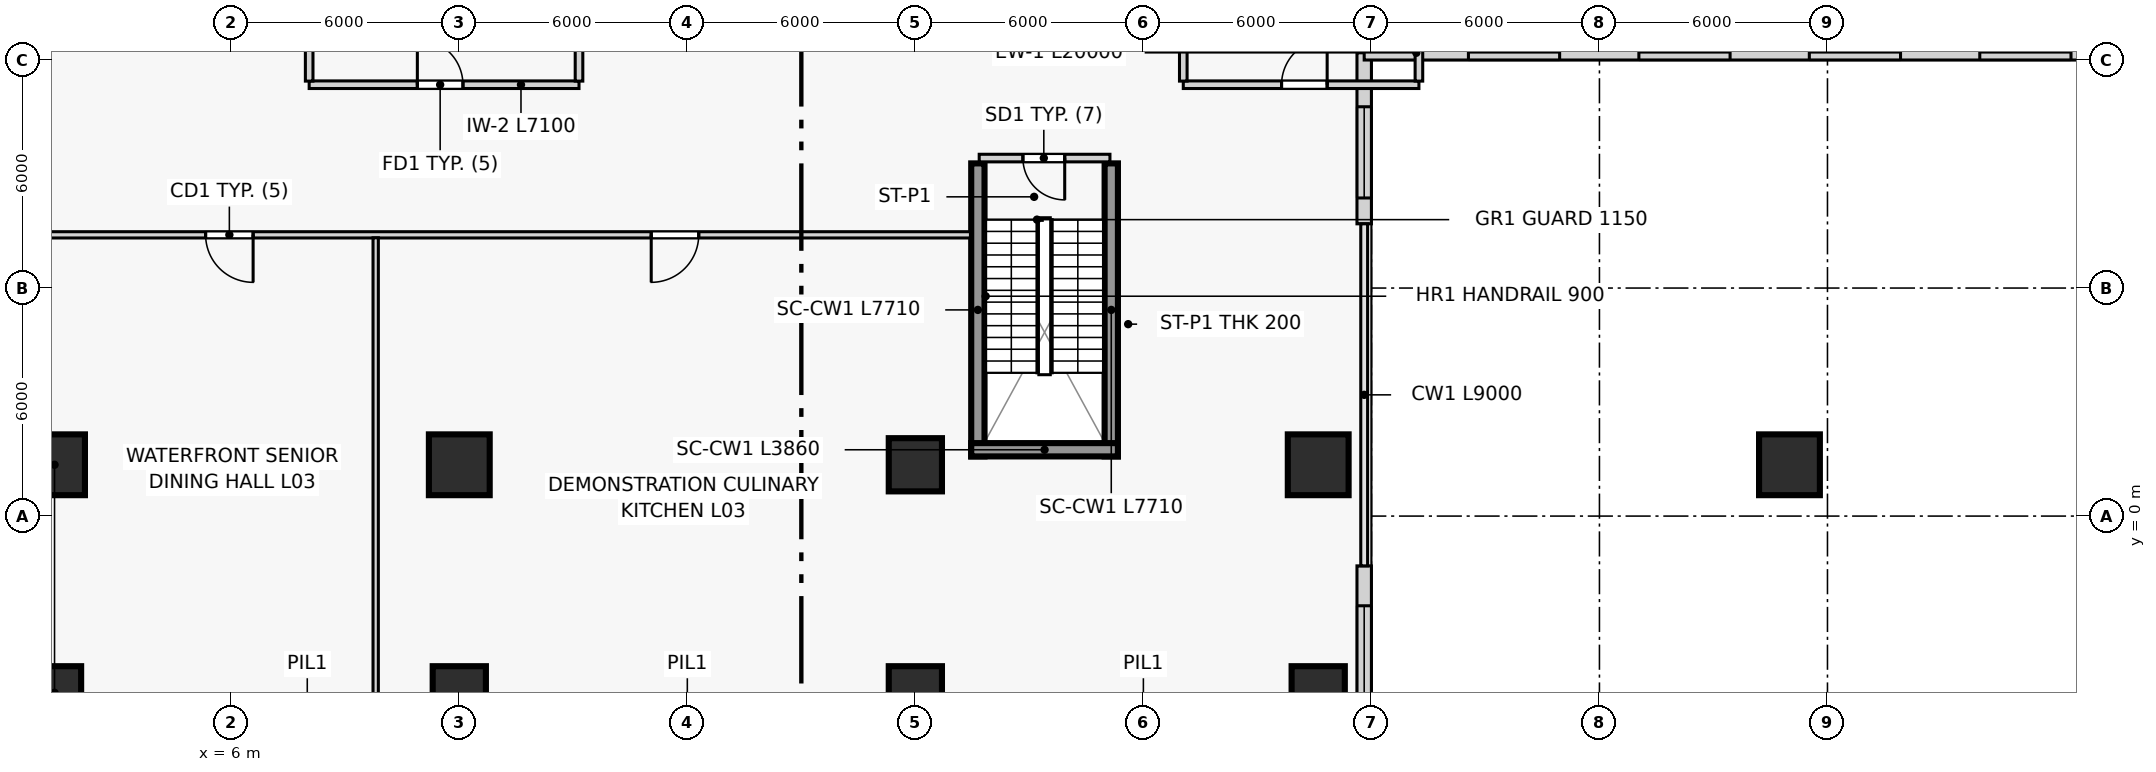
"""IFC4 building model, lengths in metres.
Left out: names, types, materials, properties, quantities, classifications, styles, units other than length and angle.
Written with IfcOpenShell. Run it as: python <this file> out.ifc"""

import sys

from ifc_helpers import new_model, si_unit, direction, frame, frame_2d, origin, origin_2d, place, context, subcontext, project, spatial, rectangle, extrude, source, transform, mapped, element, fill, save


model = new_model("IFC4")
c1 = context("Model", 3, precision=1e-05, world=origin(), true_north=direction((0.0, 1.0)))
c2 = subcontext(c1, "Body", "Model", "MODEL_VIEW")
j1 = project(units=[si_unit("LENGTHUNIT", "METRE"), si_unit("PLANEANGLEUNIT", "RADIAN")], contexts=[c1])
p1 = place(None, origin())
s1 = spatial("IfcSite", under=j1, at=p1, CompositionType="ELEMENT")
p2 = place(p1, origin())
s2 = spatial("IfcBuilding", under=s1, at=p2, CompositionType="ELEMENT")
p3 = place(p2, frame((0.0, 0.0, 13.5)))
s3 = spatial("IfcBuildingStorey", under=s2, at=p3, CompositionType="ELEMENT", Elevation=13.5)
for number, where, z_axis, x_axis in (
    (1, (25.645, 1.57, 0.0), (0.0, 0.0, 1.0), (0.0, 1.0, 0.0)),
    (2, (29.155, 1.57, 0.0), (0.0, 0.0, 1.0), (0.0, 1.0, 0.0)),
):
    element("IfcWall", number, at=place(p3, frame(where, z_axis=z_axis, x_axis=x_axis)), inside=s3, PredefinedType="SHEAR", context=c2, shape_type="SweptSolid", body=[
        extrude(rectangle(XDim=7.71, YDim=0.35, at=frame_2d((3.855, 0.0))), origin(), (0.0, 0.0, 1.0), 4.5),
    ])
p4 = place(p3, frame((25.47, 1.745, 0.0), z_axis=(0.0, 0.0, 1.0), x_axis=(1.0, 0.0, 0.0)))
e3 = element("IfcWall", 3, at=p4, inside=s3, PredefinedType="SHEAR", context=c2, shape_type="SweptSolid", body=[
    extrude(rectangle(XDim=3.86, YDim=0.35, at=frame_2d((1.93, 0.0))), origin(), (0.0, 0.0, 1.0), 4.5),
])
m1 = source(origin(), c2, "Body", "SweptSolid", [
    extrude(rectangle(XDim=1.4, YDim=1.4, at=origin_2d()), origin(), (0.0, 0.0, 1.0), 4.5),
])
p5 = place(p3, frame((1.35, -4.65, 0.0), z_axis=(0.0, 0.0, 1.0), x_axis=(1.0, 0.0, 0.0)))
e4 = element("IfcColumn", 4, at=p5, inside=s3, PredefinedType="COLUMN", context=c2, shape_type="MappedRepresentation", body=[
    mapped(m1, transform((0.0, 0.0, 0.0), scale=1.0)),
])
m2 = source(origin(), c2, "Body", "SweptSolid", [
    extrude(rectangle(XDim=1.6, YDim=1.6, at=origin_2d()), origin(), (0.0, 0.0, 1.0), 4.5),
])
p6 = place(p3, frame((1.35, 1.35, 0.0), z_axis=(0.0, 0.0, 1.0), x_axis=(1.0, 0.0, 0.0)))
e5 = element("IfcColumn", 5, at=p6, inside=s3, PredefinedType="COLUMN", context=c2, shape_type="MappedRepresentation", body=[
    mapped(m2, transform((0.0, 0.0, 0.0), scale=1.0)),
])
p7 = place(p3, frame((12.0, -4.65, 0.0), z_axis=(0.0, 0.0, 1.0), x_axis=(1.0, 0.0, 0.0)))
e6 = element("IfcColumn", 6, at=p7, inside=s3, PredefinedType="COLUMN", context=c2, shape_type="MappedRepresentation", body=[
    mapped(m1, transform((0.0, 0.0, 0.0), scale=1.0)),
])
p8 = place(p3, frame((12.0, 1.35, 0.0), z_axis=(0.0, 0.0, 1.0), x_axis=(1.0, 0.0, 0.0)))
e7 = element("IfcColumn", 7, at=p8, inside=s3, PredefinedType="COLUMN", context=c2, shape_type="MappedRepresentation", body=[
    mapped(m2, transform((0.0, 0.0, 0.0), scale=1.0)),
])
for number, where, z_axis, x_axis in (
    (8, (24.0, -4.65, 0.0), (0.0, 0.0, 1.0), (1.0, 0.0, 0.0)),
    (9, (24.0, 1.35, 0.0), (0.0, 0.0, 1.0), (1.0, 0.0, 0.0)),
    (10, (34.6, -4.65, 0.0), (0.0, 0.0, 1.0), (1.0, 0.0, 0.0)),
):
    element("IfcColumn", number, at=place(p3, frame(where, z_axis=z_axis, x_axis=x_axis)), inside=s3, PredefinedType="COLUMN", context=c2, shape_type="MappedRepresentation", body=[
        mapped(m1, transform((0.0, 0.0, 0.0), scale=1.0)),
    ])
for number, where, z_axis, x_axis in (
    (11, (34.6, 1.35, 0.0), (0.0, 0.0, 1.0), (1.0, 0.0, 0.0)),
    (12, (47.0, 1.35, 0.0), (0.0, 0.0, 1.0), (1.0, 0.0, 0.0)),
):
    element("IfcColumn", number, at=place(p3, frame(where, z_axis=z_axis, x_axis=x_axis)), inside=s3, PredefinedType="COLUMN", context=c2, shape_type="MappedRepresentation", body=[
        mapped(m2, transform((0.0, 0.0, 0.0), scale=1.0)),
    ])
p9 = place(p3, frame((35.81, -5.81, 0.0), z_axis=(0.0, 0.0, 1.0), x_axis=(0.0, 1.0, 0.0)))
e13 = element("IfcWall", 13, at=p9, inside=s3, PredefinedType="SOLIDWALL", context=c2, shape_type="SweptSolid", body=[
    extrude(rectangle(XDim=4.5, YDim=0.38, at=frame_2d((2.25, 0.0))), origin(), (0.0, 0.0, 1.0), 4.16),
])
p10 = place(p9, frame((1.05, 0.0, 0.8)))
e14 = element("IfcOpeningElement", 14, at=p10, cuts=e13, PredefinedType="OPENING", context=c2, shape_type="SweptSolid", body=[
    extrude(rectangle(XDim=2.4, YDim=2.1, at=frame_2d((1.2, 1.05))), frame((0.0, 0.2, 0.0), z_axis=(0.0, -1.0, 0.0), x_axis=(1.0, 0.0, 0.0)), (0.0, 0.0, 1.0), 0.4),
])
p11 = place(p3, frame((35.81, 7.69, 0.0), z_axis=(0.0, 0.0, 1.0), x_axis=(0.0, 1.0, 0.0)))
e15 = element("IfcWall", 15, at=p11, inside=s3, PredefinedType="SOLIDWALL", context=c2, shape_type="SweptSolid", body=[
    extrude(rectangle(XDim=4.5, YDim=0.38, at=frame_2d((2.25, 0.0))), origin(), (0.0, 0.0, 1.0), 4.16),
])
p12 = place(p11, frame((0.68, 0.0, 0.8)))
e16 = element("IfcOpeningElement", 16, at=p12, cuts=e15, PredefinedType="OPENING", context=c2, shape_type="SweptSolid", body=[
    extrude(rectangle(XDim=2.4, YDim=2.1, at=frame_2d((1.2, 1.05))), frame((0.0, 0.2, 0.0), z_axis=(0.0, -1.0, 0.0), x_axis=(1.0, 0.0, 0.0)), (0.0, 0.0, 1.0), 0.4),
])
p13 = place(p3, frame((35.81, 12.19, 0.0), z_axis=(0.0, 0.0, 1.0), x_axis=(1.0, 0.0, 0.0)))
e17 = element("IfcWall", 17, at=p13, inside=s3, PredefinedType="SOLIDWALL", context=c2, shape_type="SweptSolid", body=[
    extrude(rectangle(XDim=20.0, YDim=0.38, at=frame_2d((10.0, 0.0))), origin(), (0.0, 0.0, 1.0), 4.16),
])
p14 = place(p13, frame((2.742, 0.0, 0.8)))
e18 = element("IfcOpeningElement", 18, at=p14, cuts=e17, PredefinedType="OPENING", context=c2, shape_type="SweptSolid", body=[
    extrude(rectangle(XDim=2.4, YDim=2.1, at=frame_2d((1.2, 1.05))), frame((0.0, 0.2, 0.0), z_axis=(0.0, -1.0, 0.0), x_axis=(1.0, 0.0, 0.0)), (0.0, 0.0, 1.0), 0.4),
])
p15 = place(p13, frame((7.228, 0.0, 0.8)))
e19 = element("IfcOpeningElement", 19, at=p15, cuts=e17, PredefinedType="OPENING", context=c2, shape_type="SweptSolid", body=[
    extrude(rectangle(XDim=2.4, YDim=2.1, at=frame_2d((1.2, 1.05))), frame((0.0, 0.2, 0.0), z_axis=(0.0, -1.0, 0.0), x_axis=(1.0, 0.0, 0.0)), (0.0, 0.0, 1.0), 0.4),
])
p16 = place(p13, frame((11.712, 0.0, 0.8)))
e20 = element("IfcOpeningElement", 20, at=p16, cuts=e17, PredefinedType="OPENING", context=c2, shape_type="SweptSolid", body=[
    extrude(rectangle(XDim=2.4, YDim=2.1, at=frame_2d((1.2, 1.05))), frame((0.0, 0.2, 0.0), z_axis=(0.0, -1.0, 0.0), x_axis=(1.0, 0.0, 0.0)), (0.0, 0.0, 1.0), 0.4),
])
p17 = place(p13, frame((16.198, 0.0, 0.8)))
e21 = element("IfcOpeningElement", 21, at=p17, cuts=e17, PredefinedType="OPENING", context=c2, shape_type="SweptSolid", body=[
    extrude(rectangle(XDim=2.4, YDim=2.1, at=frame_2d((1.2, 1.05))), frame((0.0, 0.2, 0.0), z_axis=(0.0, -1.0, 0.0), x_axis=(1.0, 0.0, 0.0)), (0.0, 0.0, 1.0), 0.4),
])
p18 = place(p3, frame((8.05, 11.35, 0.0), z_axis=(0.0, 0.0, 1.0), x_axis=(1.0, 0.0, 0.0)))
e22 = element("IfcWall", 22, at=p18, inside=s3, PredefinedType="PARTITIONING", context=c2, shape_type="SweptSolid", body=[
    extrude(rectangle(XDim=7.1, YDim=0.2, at=frame_2d((3.55, 0.0))), origin(), (0.0, 0.0, 1.0), 4.16),
])
p19 = place(p18, frame((2.846, 0.0, 0.0)))
e23 = element("IfcOpeningElement", 23, at=p19, cuts=e22, PredefinedType="OPENING", context=c2, shape_type="SweptSolid", body=[
    extrude(rectangle(XDim=1.2, YDim=2.2, at=frame_2d((0.6, 1.1))), frame((0.0, 0.11, 0.0), z_axis=(0.0, -1.0, 0.0), x_axis=(1.0, 0.0, 0.0)), (0.0, 0.0, 1.0), 0.22),
])
for number, where, z_axis, x_axis in (
    (24, (8.05, 11.445, 0.0), (0.0, 0.0, 1.0), (0.0, 1.0, 0.0)),
    (25, (15.15, 11.445, 0.0), (0.0, 0.0, 1.0), (0.0, 1.0, 0.0)),
):
    element("IfcWall", number, at=place(p3, frame(where, z_axis=z_axis, x_axis=x_axis)), inside=s3, PredefinedType="PARTITIONING", context=c2, shape_type="SweptSolid", body=[
        extrude(rectangle(XDim=2.985, YDim=0.2, at=frame_2d((1.492, 0.0))), origin(), (0.0, 0.0, 1.0), 4.16),
    ])
p20 = place(p3, frame((31.05, 11.35, 0.0), z_axis=(0.0, 0.0, 1.0), x_axis=(1.0, 0.0, 0.0)))
e26 = element("IfcWall", 26, at=p20, inside=s3, PredefinedType="PARTITIONING", context=c2, shape_type="SweptSolid", body=[
    extrude(rectangle(XDim=6.2, YDim=0.2, at=frame_2d((3.1, 0.0))), origin(), (0.0, 0.0, 1.0), 4.16),
])
p21 = place(p20, frame((2.586, 0.0, 0.0)))
e27 = element("IfcOpeningElement", 27, at=p21, cuts=e26, PredefinedType="OPENING", context=c2, shape_type="SweptSolid", body=[
    extrude(rectangle(XDim=1.2, YDim=2.2, at=frame_2d((0.6, 1.1))), frame((0.0, 0.11, 0.0), z_axis=(0.0, -1.0, 0.0), x_axis=(1.0, 0.0, 0.0)), (0.0, 0.0, 1.0), 0.22),
])
for number, where, z_axis, x_axis in (
    (28, (31.05, 11.445, 0.0), (0.0, 0.0, 1.0), (0.0, 1.0, 0.0)),
    (29, (37.25, 11.445, 0.0), (0.0, 0.0, 1.0), (0.0, 1.0, 0.0)),
):
    element("IfcWall", number, at=place(p3, frame(where, z_axis=z_axis, x_axis=x_axis)), inside=s3, PredefinedType="PARTITIONING", context=c2, shape_type="SweptSolid", body=[
        extrude(rectangle(XDim=2.985, YDim=0.2, at=frame_2d((1.492, 0.0))), origin(), (0.0, 0.0, 1.0), 4.16),
    ])
p22 = place(p3, frame((25.68, 9.42, 0.0), z_axis=(0.0, 0.0, 1.0), x_axis=(1.0, 0.0, 0.0)))
e30 = element("IfcWall", 30, at=p22, inside=s3, PredefinedType="PARTITIONING", context=c2, shape_type="SweptSolid", body=[
    extrude(rectangle(XDim=3.44, YDim=0.2, at=frame_2d((1.72, 0.0))), origin(), (0.0, 0.0, 1.0), 4.16),
])
p23 = place(p22, frame((1.15, 0.0, 0.0)))
e31 = element("IfcOpeningElement", 31, at=p23, cuts=e30, PredefinedType="OPENING", context=c2, shape_type="SweptSolid", body=[
    extrude(rectangle(XDim=1.1, YDim=2.2, at=frame_2d((0.55, 1.1))), frame((0.0, 0.11, 0.0), z_axis=(0.0, -1.0, 0.0), x_axis=(1.0, 0.0, 0.0)), (0.0, 0.0, 1.0), 0.22),
])
p24 = place(p3, frame((0.185, 7.4, 0.0), z_axis=(0.0, 0.0, 1.0), x_axis=(1.0, 0.0, 0.0)))
e32 = element("IfcWall", 32, at=p24, inside=s3, PredefinedType="PARTITIONING", context=c2, shape_type="SweptSolid", body=[
    extrude(rectangle(XDim=25.265, YDim=0.165, at=frame_2d((12.632, 0.0))), origin(), (0.0, 0.0, 1.0), 4.16),
])
p25 = place(p24, frame((5.14, 0.0, 0.0)))
e33 = element("IfcOpeningElement", 33, at=p25, cuts=e32, PredefinedType="OPENING", context=c2, shape_type="SweptSolid", body=[
    extrude(rectangle(XDim=1.25, YDim=2.2, at=frame_2d((0.625, 1.1))), frame((0.0, 0.093, 0.0), z_axis=(0.0, -1.0, 0.0), x_axis=(1.0, 0.0, 0.0)), (0.0, 0.0, 1.0), 0.185),
])
p26 = place(p24, frame((16.865, 0.0, 0.0)))
e34 = element("IfcOpeningElement", 34, at=p26, cuts=e32, PredefinedType="OPENING", context=c2, shape_type="SweptSolid", body=[
    extrude(rectangle(XDim=1.25, YDim=2.2, at=frame_2d((0.625, 1.1))), frame((0.0, 0.093, 0.0), z_axis=(0.0, -1.0, 0.0), x_axis=(1.0, 0.0, 0.0)), (0.0, 0.0, 1.0), 0.185),
])
p27 = place(p3, frame((9.8, -5.815, 0.0), z_axis=(0.0, 0.0, 1.0), x_axis=(0.0, 1.0, 0.0)))
e35 = element("IfcWall", 35, at=p27, inside=s3, PredefinedType="PARTITIONING", context=c2, shape_type="SweptSolid", body=[
    extrude(rectangle(XDim=13.137, YDim=0.14, at=frame_2d((6.569, 0.0))), origin(), (0.0, 0.0, 1.0), 4.16),
])
m3 = source(origin(), c2, "Body", "SweptSolid", [
    extrude(rectangle(XDim=2.4, YDim=2.1, at=frame_2d((1.2, 1.05))), frame((0.0, 0.03, 0.0), z_axis=(0.0, -1.0, 0.0), x_axis=(1.0, 0.0, 0.0)), (0.0, 0.0, 1.0), 0.06),
])
p28 = place(p10, origin())
e36 = element("IfcWindow", 36, at=p28, inside=s3, PartitioningType="SINGLE_PANEL", PredefinedType="WINDOW", context=c2, shape_type="MappedRepresentation", body=[
    mapped(m3, transform((0.0, 0.0, 0.0), scale=1.0)),
])
fill(e14, e36)
p29 = place(p12, origin())
e37 = element("IfcWindow", 37, at=p29, inside=s3, PartitioningType="SINGLE_PANEL", PredefinedType="WINDOW", context=c2, shape_type="MappedRepresentation", body=[
    mapped(m3, transform((0.0, 0.0, 0.0), scale=1.0)),
])
fill(e16, e37)
p30 = place(p14, origin())
e38 = element("IfcWindow", 38, at=p30, inside=s3, PartitioningType="SINGLE_PANEL", PredefinedType="WINDOW", context=c2, shape_type="MappedRepresentation", body=[
    mapped(m3, transform((0.0, 0.0, 0.0), scale=1.0)),
])
fill(e18, e38)
p31 = place(p15, origin())
e39 = element("IfcWindow", 39, at=p31, inside=s3, PartitioningType="SINGLE_PANEL", PredefinedType="WINDOW", context=c2, shape_type="MappedRepresentation", body=[
    mapped(m3, transform((0.0, 0.0, 0.0), scale=1.0)),
])
fill(e19, e39)
p32 = place(p16, origin())
e40 = element("IfcWindow", 40, at=p32, inside=s3, PartitioningType="SINGLE_PANEL", PredefinedType="WINDOW", context=c2, shape_type="MappedRepresentation", body=[
    mapped(m3, transform((0.0, 0.0, 0.0), scale=1.0)),
])
fill(e20, e40)
p33 = place(p17, origin())
e41 = element("IfcWindow", 41, at=p33, inside=s3, PartitioningType="SINGLE_PANEL", PredefinedType="WINDOW", context=c2, shape_type="MappedRepresentation", body=[
    mapped(m3, transform((0.0, 0.0, 0.0), scale=1.0)),
])
fill(e21, e41)
m4 = source(origin(), c2, "Body", "SweptSolid", [
    extrude(rectangle(XDim=1.2, YDim=2.2, at=frame_2d((0.6, 1.1))), frame((0.0, 0.025, 0.0), z_axis=(0.0, -1.0, 0.0), x_axis=(1.0, 0.0, 0.0)), (0.0, 0.0, 1.0), 0.05),
])
p34 = place(p19, origin())
e42 = element("IfcDoor", 42, at=p34, inside=s3, OperationType="SINGLE_SWING_LEFT", PredefinedType="DOOR", context=c2, shape_type="MappedRepresentation", body=[
    mapped(m4, transform((0.0, 0.0, 0.0), scale=1.0)),
])
fill(e23, e42)
p35 = place(p21, origin())
e43 = element("IfcDoor", 43, at=p35, inside=s3, OperationType="SINGLE_SWING_RIGHT", PredefinedType="DOOR", context=c2, shape_type="MappedRepresentation", body=[
    mapped(m4, transform((0.0, 0.0, 0.0), scale=1.0)),
])
fill(e27, e43)
m5 = source(origin(), c2, "Body", "SweptSolid", [
    extrude(rectangle(XDim=1.1, YDim=2.2, at=frame_2d((0.55, 1.1))), frame((0.0, 0.025, 0.0), z_axis=(0.0, -1.0, 0.0), x_axis=(1.0, 0.0, 0.0)), (0.0, 0.0, 1.0), 0.05),
])
p36 = place(p23, frame((1.1, 0.0, 0.0), z_axis=(0.0, 0.0, 1.0), x_axis=(-1.0, 0.0, 0.0)))
e44 = element("IfcDoor", 44, at=p36, inside=s3, OperationType="SINGLE_SWING_LEFT", PredefinedType="DOOR", context=c2, shape_type="MappedRepresentation", body=[
    mapped(m5, transform((0.0, 0.0, 0.0), scale=1.0)),
])
fill(e31, e44)
m6 = source(origin(), c2, "Body", "SweptSolid", [
    extrude(rectangle(XDim=1.25, YDim=2.2, at=frame_2d((0.625, 1.1))), frame((0.0, 0.025, 0.0), z_axis=(0.0, -1.0, 0.0), x_axis=(1.0, 0.0, 0.0)), (0.0, 0.0, 1.0), 0.05),
])
p37 = place(p25, frame((1.25, 0.0, 0.0), z_axis=(0.0, 0.0, 1.0), x_axis=(-1.0, 0.0, 0.0)))
e45 = element("IfcDoor", 45, at=p37, inside=s3, OperationType="SINGLE_SWING_LEFT", PredefinedType="DOOR", context=c2, shape_type="MappedRepresentation", body=[
    mapped(m6, transform((0.0, 0.0, 0.0), scale=1.0)),
])
fill(e33, e45)
p38 = place(p26, frame((1.25, 0.0, 0.0), z_axis=(0.0, 0.0, 1.0), x_axis=(-1.0, 0.0, 0.0)))
e46 = element("IfcDoor", 46, at=p38, inside=s3, OperationType="SINGLE_SWING_RIGHT", PredefinedType="DOOR", context=c2, shape_type="MappedRepresentation", body=[
    mapped(m6, transform((0.0, 0.0, 0.0), scale=1.0)),
])
fill(e34, e46)
save(model, sys.argv[1])
